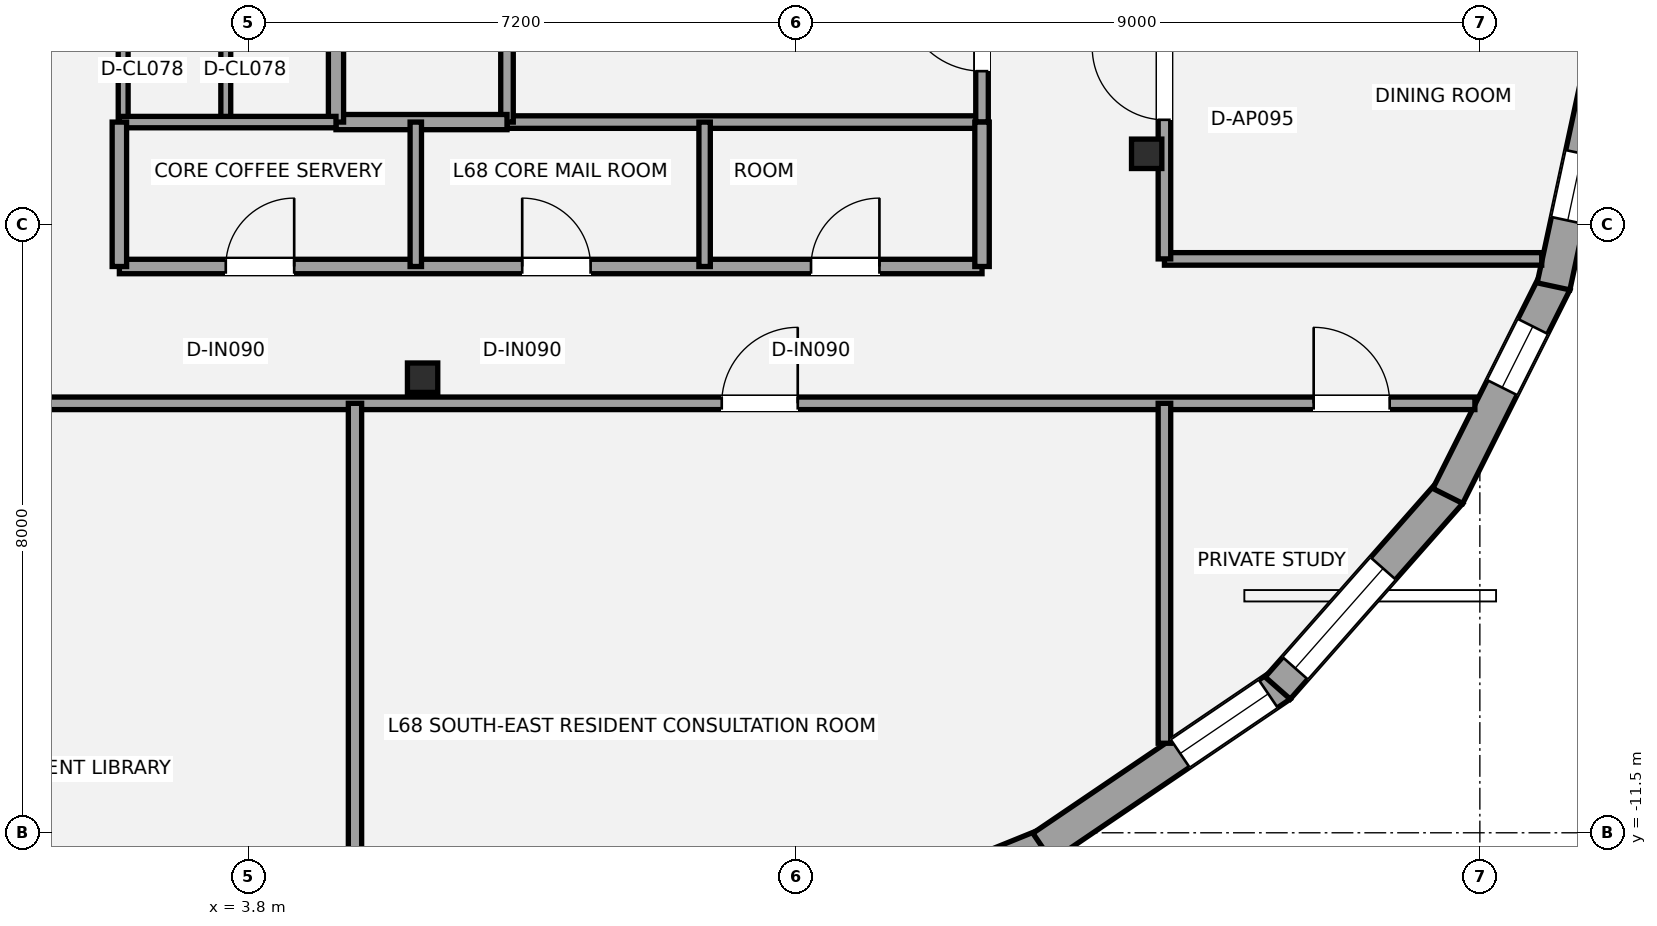
"""IFC4 building model, lengths in metres.
Left out: names, types, materials, properties, quantities, classifications, styles, units other than length and angle.
Written with IfcOpenShell. Run it as: python <this file> out.ifc"""

import sys

from ifc_helpers import new_model, si_unit, direction, frame, frame_2d, origin, origin_2d, place, context, subcontext, project, spatial, rectangle, i_section, extrude, element, fill, save


model = new_model("IFC4")
c1 = context("Model", 3, precision=1e-05, world=origin(), true_north=direction((0.0, 1.0)))
c2 = subcontext(c1, "Body", "Model", "MODEL_VIEW")
j1 = project(units=[si_unit("LENGTHUNIT", "METRE"), si_unit("PLANEANGLEUNIT", "RADIAN")], contexts=[c1])
p1 = place(None, origin())
s1 = spatial("IfcSite", under=j1, at=p1, CompositionType="ELEMENT")
p2 = place(p1, origin())
s2 = spatial("IfcBuilding", under=s1, at=p2, CompositionType="ELEMENT")
p3 = place(p2, frame((0.0, 0.0, 241.5)))
s3 = spatial("IfcBuildingStorey", under=s2, at=p3, CompositionType="ELEMENT", Elevation=241.5)
for number, where, z_axis, x_axis in (
    (1, (6.09, -5.513, 0.0), (0.0, 0.0, 1.0), (1.0, 0.0, 0.0)),
    (2, (15.616, -2.567, 0.0), (0.0, 0.0, 1.0), (1.0, 0.0, 0.0)),
):
    element("IfcColumn", number, at=place(p3, frame(where, z_axis=z_axis, x_axis=x_axis)), inside=s3, PredefinedType="COLUMN", context=c2, shape_type="SweptSolid", body=[
        extrude(i_section(OverallWidth=0.399, OverallDepth=0.387, WebThickness=0.021, FlangeThickness=0.033, at=origin_2d()), origin(), (0.0, 0.0, 1.0), 3.15),
    ])
p4 = place(p3, frame((14.283, -11.666, 0.0), z_axis=(0.0, 0.0, 1.0), x_axis=(-0.926731976866, -0.375723093586, 0.0)))
e3 = element("IfcWall", 3, at=p4, inside=s3, PredefinedType="STANDARD", context=c2, shape_type="SweptSolid", body=[
    extrude(rectangle(XDim=4.096, YDim=0.44, at=frame_2d((2.048, 0.0))), origin(), (0.0, 0.0, 1.0), 2.336),
])
p5 = place(p4, frame((1.498, 0.0, 0.55)))
e4 = element("IfcOpeningElement", 4, at=p5, cuts=e3, PredefinedType="OPENING", context=c2, shape_type="SweptSolid", body=[
    extrude(rectangle(XDim=1.75, YDim=1.55, at=frame_2d((0.875, 0.775))), frame((0.0, 0.23, 0.0), z_axis=(0.0, -1.0, 0.0), x_axis=(1.0, 0.0, 0.0)), (0.0, 0.0, 1.0), 0.46),
])
p6 = place(p3, frame((17.381, -9.559, 0.0), z_axis=(0.0, 0.0, 1.0), x_axis=(-0.827637036896, -0.561263694851, 0.0)))
e5 = element("IfcWall", 5, at=p6, inside=s3, PredefinedType="STANDARD", context=c2, shape_type="SweptSolid", body=[
    extrude(rectangle(XDim=3.793, YDim=0.44, at=frame_2d((1.896, 0.0))), origin(), (0.0, 0.0, 1.0), 2.336),
])
p7 = place(p6, frame((0.2, 0.0, 0.58)))
e6 = element("IfcOpeningElement", 6, at=p7, cuts=e5, PredefinedType="OPENING", context=c2, shape_type="SweptSolid", body=[
    extrude(rectangle(XDim=1.4, YDim=1.55, at=frame_2d((0.7, 0.775))), frame((0.0, 0.23, 0.0), z_axis=(0.0, -1.0, 0.0), x_axis=(1.0, 0.0, 0.0)), (0.0, 0.0, 1.0), 0.46),
])
p8 = place(p3, frame((19.61, -7.022, 0.0), z_axis=(0.0, 0.0, 1.0), x_axis=(-0.66136043846, -0.750068243855, 0.0)))
e7 = element("IfcWall", 7, at=p8, inside=s3, PredefinedType="STANDARD", context=c2, shape_type="SweptSolid", body=[
    extrude(rectangle(XDim=3.432, YDim=0.44, at=frame_2d((1.716, 0.0))), origin(), (0.0, 0.0, 1.0), 2.336),
])
p9 = place(p8, frame((1.334, 0.0, 0.55)))
e8 = element("IfcOpeningElement", 8, at=p9, cuts=e7, PredefinedType="OPENING", context=c2, shape_type="SweptSolid", body=[
    extrude(rectangle(XDim=1.75, YDim=1.55, at=frame_2d((0.875, 0.775))), frame((0.0, 0.23, 0.0), z_axis=(0.0, -1.0, 0.0), x_axis=(1.0, 0.0, 0.0)), (0.0, 0.0, 1.0), 0.46),
])
p10 = place(p3, frame((20.988, -4.259, 0.0), z_axis=(0.0, 0.0, 1.0), x_axis=(-0.448424724145, -0.893820601002, 0.0)))
e9 = element("IfcWall", 9, at=p10, inside=s3, PredefinedType="STANDARD", context=c2, shape_type="SweptSolid", body=[
    extrude(rectangle(XDim=3.144, YDim=0.44, at=frame_2d((1.572, 0.0))), origin(), (0.0, 0.0, 1.0), 2.336),
])
p11 = place(p10, frame((0.648, 0.0, 0.58)))
e10 = element("IfcOpeningElement", 10, at=p11, cuts=e9, PredefinedType="OPENING", context=c2, shape_type="SweptSolid", body=[
    extrude(rectangle(XDim=0.9, YDim=1.35, at=frame_2d((0.45, 0.675))), frame((0.0, 0.23, 0.0), z_axis=(0.0, -1.0, 0.0), x_axis=(1.0, 0.0, 0.0)), (0.0, 0.0, 1.0), 0.46),
])
p12 = place(p3, frame((21.594, -1.41, 0.0), z_axis=(0.0, 0.0, 1.0), x_axis=(-0.210540350534, -0.977585168053, 0.0)))
e11 = element("IfcWall", 11, at=p12, inside=s3, PredefinedType="STANDARD", context=c2, shape_type="SweptSolid", body=[
    extrude(rectangle(XDim=2.967, YDim=0.44, at=frame_2d((1.484, 0.0))), origin(), (0.0, 0.0, 1.0), 2.336),
])
p13 = place(p12, frame((1.181, 0.0, 0.58)))
e12 = element("IfcOpeningElement", 12, at=p13, cuts=e11, PredefinedType="OPENING", context=c2, shape_type="SweptSolid", body=[
    extrude(rectangle(XDim=0.9, YDim=1.35, at=frame_2d((0.45, 0.675))), frame((0.0, 0.23, 0.0), z_axis=(0.0, -1.0, 0.0), x_axis=(1.0, 0.0, 0.0)), (0.0, 0.0, 1.0), 0.46),
])
p14 = place(p3, frame((7.2, -2.15, 0.0), z_axis=(0.0, 0.0, 1.0), x_axis=(1.0, 0.0, 0.0)))
e13 = element("IfcWall", 13, at=p14, inside=s3, PredefinedType="PARTITIONING", context=c2, shape_type="SweptSolid", body=[
    extrude(rectangle(XDim=6.25, YDim=0.165, at=frame_2d((3.125, 0.0))), origin(), (0.0, 0.0, 1.0), 2.97),
])
p15 = place(p3, frame((7.2, -2.15, 0.0), z_axis=(0.0, 0.0, 1.0), x_axis=(0.0, 1.0, 0.0)))
e14 = element("IfcWall", 14, at=p15, inside=s3, PredefinedType="PARTITIONING", context=c2, shape_type="SweptSolid", body=[
    extrude(rectangle(XDim=3.5, YDim=0.165, at=frame_2d((1.75, 0.0))), origin(), (0.0, 0.0, 1.0), 2.423),
])
p16 = place(p3, frame((13.45, -2.15, 0.0), z_axis=(0.0, 0.0, 1.0), x_axis=(0.0, 1.0, 0.0)))
e15 = element("IfcWall", 15, at=p16, inside=s3, PredefinedType="PARTITIONING", context=c2, shape_type="SweptSolid", body=[
    extrude(rectangle(XDim=3.5, YDim=0.165, at=frame_2d((1.75, 0.0))), origin(), (0.0, 0.0, 1.0), 2.423),
])
p17 = place(p16, frame((0.67, 0.0, 0.0)))
e16 = element("IfcOpeningElement", 16, at=p17, cuts=e15, PredefinedType="OPENING", context=c2, shape_type="SweptSolid", body=[
    extrude(rectangle(XDim=1.05, YDim=2.15, at=frame_2d((0.525, 1.075))), frame((0.0, 0.093, 0.0), z_axis=(0.0, -1.0, 0.0), x_axis=(1.0, 0.0, 0.0)), (0.0, 0.0, 1.0), 0.185),
])
p18 = place(p3, frame((4.95, -2.15, 0.0), z_axis=(0.0, 0.0, 1.0), x_axis=(1.0, 0.0, 0.0)))
e17 = element("IfcWall", 17, at=p18, inside=s3, PredefinedType="SOLIDWALL", context=c2, shape_type="SweptSolid", body=[
    extrude(rectangle(XDim=2.25, YDim=0.2, at=frame_2d((1.125, 0.0))), origin(), (0.0, 0.0, 1.0), 2.97),
])
p19 = place(p3, frame((4.95, -2.15, 0.0), z_axis=(0.0, 0.0, 1.0), x_axis=(0.0, 1.0, 0.0)))
e18 = element("IfcWall", 18, at=p19, inside=s3, PredefinedType="SOLIDWALL", context=c2, shape_type="SweptSolid", body=[
    extrude(rectangle(XDim=3.5, YDim=0.2, at=frame_2d((1.75, 0.0))), origin(), (0.0, 0.0, 1.0), 2.423),
])
p20 = place(p19, frame((0.95, 0.0, 0.0)))
e19 = element("IfcOpeningElement", 19, at=p20, cuts=e18, PredefinedType="OPENING", context=c2, shape_type="SweptSolid", body=[
    extrude(rectangle(XDim=0.75, YDim=2.1, at=frame_2d((0.375, 1.05))), frame((0.0, 0.11, 0.0), z_axis=(0.0, -1.0, 0.0), x_axis=(1.0, 0.0, 0.0)), (0.0, 0.0, 1.0), 0.22),
])
for number, where, z_axis, x_axis in (
    (20, (2.15, -2.15, 0.0), (0.0, 0.0, 1.0), (0.0, 1.0, 0.0)),
    (21, (3.5, -2.15, 0.0), (0.0, 0.0, 1.0), (0.0, 1.0, 0.0)),
):
    element("IfcWall", number, at=place(p3, frame(where, z_axis=z_axis, x_axis=x_axis)), inside=s3, PredefinedType="PARTITIONING", context=c2, shape_type="SweptSolid", body=[
        extrude(rectangle(XDim=1.8, YDim=0.13, at=frame_2d((0.9, 0.0))), origin(), (0.0, 0.0, 1.0), 2.97),
    ])
p21 = place(p3, frame((2.1, -4.05, 0.0), z_axis=(0.0, 0.0, 1.0), x_axis=(1.0, 0.0, 0.0)))
e22 = element("IfcWall", 22, at=p21, inside=s3, PredefinedType="PLUMBINGWALL", context=c2, shape_type="SweptSolid", body=[
    extrude(rectangle(XDim=11.35, YDim=0.19, at=frame_2d((5.675, 0.0))), origin(), (0.0, 0.0, 1.0), 2.357),
])
p22 = place(p21, frame((1.4, 0.0, 0.0)))
e23 = element("IfcOpeningElement", 23, at=p22, cuts=e22, PredefinedType="OPENING", context=c2, shape_type="SweptSolid", body=[
    extrude(rectangle(XDim=0.9, YDim=2.1, at=frame_2d((0.45, 1.05))), frame((0.0, 0.105, 0.0), z_axis=(0.0, -1.0, 0.0), x_axis=(1.0, 0.0, 0.0)), (0.0, 0.0, 1.0), 0.21),
])
p23 = place(p21, frame((5.3, 0.0, 0.0)))
e24 = element("IfcOpeningElement", 24, at=p23, cuts=e22, PredefinedType="OPENING", context=c2, shape_type="SweptSolid", body=[
    extrude(rectangle(XDim=0.9, YDim=2.1, at=frame_2d((0.45, 1.05))), frame((0.0, 0.105, 0.0), z_axis=(0.0, -1.0, 0.0), x_axis=(1.0, 0.0, 0.0)), (0.0, 0.0, 1.0), 0.21),
])
p24 = place(p21, frame((9.1, 0.0, 0.0)))
e25 = element("IfcOpeningElement", 25, at=p24, cuts=e22, PredefinedType="OPENING", context=c2, shape_type="SweptSolid", body=[
    extrude(rectangle(XDim=0.9, YDim=2.1, at=frame_2d((0.45, 1.05))), frame((0.0, 0.105, 0.0), z_axis=(0.0, -1.0, 0.0), x_axis=(1.0, 0.0, 0.0)), (0.0, 0.0, 1.0), 0.21),
])
p25 = place(p3, frame((2.1, -2.15, 0.0), z_axis=(0.0, 0.0, 1.0), x_axis=(1.0, 0.0, 0.0)))
e26 = element("IfcWall", 26, at=p25, inside=s3, PredefinedType="PLUMBINGWALL", context=c2, shape_type="SweptSolid", body=[
    extrude(rectangle(XDim=2.85, YDim=0.15, at=frame_2d((1.425, 0.0))), origin(), (0.0, 0.0, 1.0), 2.97),
])
p26 = place(p3, frame((2.1, -4.05, 0.0), z_axis=(0.0, 0.0, 1.0), x_axis=(0.0, 1.0, 0.0)))
e27 = element("IfcWall", 27, at=p26, inside=s3, PredefinedType="PLUMBINGWALL", context=c2, shape_type="SweptSolid", body=[
    extrude(rectangle(XDim=1.9, YDim=0.19, at=frame_2d((0.95, 0.0))), origin(), (0.0, 0.0, 1.0), 2.97),
])
p27 = place(p3, frame((13.45, -4.05, 0.0), z_axis=(0.0, 0.0, 1.0), x_axis=(0.0, 1.0, 0.0)))
e28 = element("IfcWall", 28, at=p27, inside=s3, PredefinedType="PLUMBINGWALL", context=c2, shape_type="SweptSolid", body=[
    extrude(rectangle(XDim=1.9, YDim=0.19, at=frame_2d((0.95, 0.0))), origin(), (0.0, 0.0, 1.0), 2.423),
])
p28 = place(p3, frame((6.0, -4.05, 0.0), z_axis=(0.0, 0.0, 1.0), x_axis=(0.0, 1.0, 0.0)))
e29 = element("IfcWall", 29, at=p28, inside=s3, PredefinedType="PLUMBINGWALL", context=c2, shape_type="SweptSolid", body=[
    extrude(rectangle(XDim=1.9, YDim=0.15, at=frame_2d((0.95, 0.0))), origin(), (0.0, 0.0, 1.0), 2.431),
])
p29 = place(p3, frame((9.8, -4.05, 0.0), z_axis=(0.0, 0.0, 1.0), x_axis=(0.0, 1.0, 0.0)))
e30 = element("IfcWall", 30, at=p29, inside=s3, PredefinedType="PLUMBINGWALL", context=c2, shape_type="SweptSolid", body=[
    extrude(rectangle(XDim=1.9, YDim=0.15, at=frame_2d((0.95, 0.0))), origin(), (0.0, 0.0, 1.0), 2.97),
])
p30 = place(p3, frame((-19.935, -5.85, 0.0), z_axis=(0.0, 0.0, 1.0), x_axis=(1.0, 0.0, 0.0)))
e31 = element("IfcWall", 31, at=p30, inside=s3, PredefinedType="PARTITIONING", context=c2, shape_type="SweptSolid", body=[
    extrude(rectangle(XDim=39.869, YDim=0.165, at=frame_2d((19.935, 0.0))), origin(), (0.0, 0.0, 1.0), 2.423),
])
p31 = place(p30, frame((1.221, 0.0, 0.0)))
e32 = element("IfcOpeningElement", 32, at=p31, cuts=e31, PredefinedType="OPENING", context=c2, shape_type="SweptSolid", body=[
    extrude(rectangle(XDim=1.0, YDim=2.15, at=frame_2d((0.5, 1.075))), frame((0.0, 0.093, 0.0), z_axis=(0.0, -1.0, 0.0), x_axis=(1.0, 0.0, 0.0)), (0.0, 0.0, 1.0), 0.185),
])
p32 = place(p30, frame((37.748, 0.0, 0.0)))
e33 = element("IfcOpeningElement", 33, at=p32, cuts=e31, PredefinedType="OPENING", context=c2, shape_type="SweptSolid", body=[
    extrude(rectangle(XDim=1.0, YDim=2.15, at=frame_2d((0.5, 1.075))), frame((0.0, 0.093, 0.0), z_axis=(0.0, -1.0, 0.0), x_axis=(1.0, 0.0, 0.0)), (0.0, 0.0, 1.0), 0.185),
])
p33 = place(p30, frame((9.01, 0.0, 0.0)))
e34 = element("IfcOpeningElement", 34, at=p33, cuts=e31, PredefinedType="OPENING", context=c2, shape_type="SweptSolid", body=[
    extrude(rectangle(XDim=1.0, YDim=2.15, at=frame_2d((0.5, 1.075))), frame((0.0, 0.093, 0.0), z_axis=(0.0, -1.0, 0.0), x_axis=(1.0, 0.0, 0.0)), (0.0, 0.0, 1.0), 0.185),
])
p34 = place(p30, frame((19.435, 0.0, 0.0)))
e35 = element("IfcOpeningElement", 35, at=p34, cuts=e31, PredefinedType="OPENING", context=c2, shape_type="SweptSolid", body=[
    extrude(rectangle(XDim=1.0, YDim=2.15, at=frame_2d((0.5, 1.075))), frame((0.0, 0.093, 0.0), z_axis=(0.0, -1.0, 0.0), x_axis=(1.0, 0.0, 0.0)), (0.0, 0.0, 1.0), 0.185),
])
p35 = place(p30, frame((29.96, 0.0, 0.0)))
e36 = element("IfcOpeningElement", 36, at=p35, cuts=e31, PredefinedType="OPENING", context=c2, shape_type="SweptSolid", body=[
    extrude(rectangle(XDim=1.0, YDim=2.15, at=frame_2d((0.5, 1.075))), frame((0.0, 0.093, 0.0), z_axis=(0.0, -1.0, 0.0), x_axis=(1.0, 0.0, 0.0)), (0.0, 0.0, 1.0), 0.185),
])
p36 = place(p3, frame((15.85, -3.95, 0.0), z_axis=(0.0, 0.0, 1.0), x_axis=(1.0, 0.0, 0.0)))
e37 = element("IfcWall", 37, at=p36, inside=s3, PredefinedType="PARTITIONING", context=c2, shape_type="SweptSolid", body=[
    extrude(rectangle(XDim=4.964, YDim=0.165, at=frame_2d((2.482, 0.0))), origin(), (0.0, 0.0, 1.0), 2.423),
])
p37 = place(p3, frame((15.85, -3.95, 0.0), z_axis=(0.0, 0.0, 1.0), x_axis=(0.0, 1.0, 0.0)))
e38 = element("IfcWall", 38, at=p37, inside=s3, PredefinedType="PARTITIONING", context=c2, shape_type="SweptSolid", body=[
    extrude(rectangle(XDim=3.6, YDim=0.165, at=frame_2d((1.8, 0.0))), origin(), (0.0, 0.0, 1.0), 2.357),
])
p38 = place(p37, frame((1.83, 0.0, 0.0)))
e39 = element("IfcOpeningElement", 39, at=p38, cuts=e38, PredefinedType="OPENING", context=c2, shape_type="SweptSolid", body=[
    extrude(rectangle(XDim=0.95, YDim=2.15, at=frame_2d((0.475, 1.075))), frame((0.0, 0.093, 0.0), z_axis=(0.0, -1.0, 0.0), x_axis=(1.0, 0.0, 0.0)), (0.0, 0.0, 1.0), 0.185),
])
p39 = place(p3, frame((15.85, -10.322, 0.0), z_axis=(0.0, 0.0, 1.0), x_axis=(0.0, 1.0, 0.0)))
e40 = element("IfcWall", 40, at=p39, inside=s3, PredefinedType="PARTITIONING", context=c2, shape_type="SweptSolid", body=[
    extrude(rectangle(XDim=4.472, YDim=0.165, at=frame_2d((2.236, 0.0))), origin(), (0.0, 0.0, 1.0), 2.423),
])
p40 = place(p3, frame((5.2, -14.036, 0.0), z_axis=(0.0, 0.0, 1.0), x_axis=(0.0, 1.0, 0.0)))
e41 = element("IfcWall", 41, at=p40, inside=s3, PredefinedType="PARTITIONING", context=c2, shape_type="SweptSolid", body=[
    extrude(rectangle(XDim=8.186, YDim=0.175, at=frame_2d((4.093, 0.0))), origin(), (0.0, 0.0, 1.0), 2.97),
])
p41 = place(p7, origin())
e42 = element("IfcWindow", 42, at=p41, inside=s3, PartitioningType="SINGLE_PANEL", PredefinedType="WINDOW", context=c2, shape_type="SweptSolid", body=[
    extrude(rectangle(XDim=1.4, YDim=1.55, at=frame_2d((0.7, 0.775))), frame((0.0, -0.01, 0.0), z_axis=(0.0, -1.0, 0.0), x_axis=(1.0, 0.0, 0.0)), (0.0, 0.0, 1.0), 0.06),
])
fill(e6, e42)
p42 = place(p9, origin())
e43 = element("IfcWindow", 43, at=p42, inside=s3, PartitioningType="SINGLE_PANEL", PredefinedType="WINDOW", context=c2, shape_type="SweptSolid", body=[
    extrude(rectangle(XDim=1.75, YDim=1.55, at=frame_2d((0.875, 0.775))), frame((0.0, -0.01, 0.0), z_axis=(0.0, -1.0, 0.0), x_axis=(1.0, 0.0, 0.0)), (0.0, 0.0, 1.0), 0.06),
])
fill(e8, e43)
p43 = place(p11, origin())
e44 = element("IfcWindow", 44, at=p43, inside=s3, PartitioningType="SINGLE_PANEL", PredefinedType="WINDOW", context=c2, shape_type="SweptSolid", body=[
    extrude(rectangle(XDim=0.9, YDim=1.35, at=frame_2d((0.45, 0.675))), frame((0.0, -0.01, 0.0), z_axis=(0.0, -1.0, 0.0), x_axis=(1.0, 0.0, 0.0)), (0.0, 0.0, 1.0), 0.06),
])
fill(e10, e44)
p44 = place(p13, origin())
e45 = element("IfcWindow", 45, at=p44, inside=s3, PartitioningType="SINGLE_PANEL", PredefinedType="WINDOW", context=c2, shape_type="SweptSolid", body=[
    extrude(rectangle(XDim=0.9, YDim=1.35, at=frame_2d((0.45, 0.675))), frame((0.0, -0.01, 0.0), z_axis=(0.0, -1.0, 0.0), x_axis=(1.0, 0.0, 0.0)), (0.0, 0.0, 1.0), 0.06),
])
fill(e12, e45)
p45 = place(p17, origin())
e46 = element("IfcDoor", 46, at=p45, inside=s3, OperationType="SINGLE_SWING_RIGHT", PredefinedType="DOOR", context=c2, shape_type="SweptSolid", body=[
    extrude(rectangle(XDim=1.05, YDim=2.15, at=frame_2d((0.525, 1.075))), frame((0.0, 0.025, 0.0), z_axis=(0.0, -1.0, 0.0), x_axis=(1.0, 0.0, 0.0)), (0.0, 0.0, 1.0), 0.05),
])
fill(e16, e46)
p46 = place(p22, origin())
e47 = element("IfcDoor", 47, at=p46, inside=s3, OperationType="SINGLE_SWING_RIGHT", PredefinedType="DOOR", context=c2, shape_type="SweptSolid", body=[
    extrude(rectangle(XDim=0.9, YDim=2.1, at=frame_2d((0.45, 1.05))), frame((0.0, 0.025, 0.0), z_axis=(0.0, -1.0, 0.0), x_axis=(1.0, 0.0, 0.0)), (0.0, 0.0, 1.0), 0.05),
])
fill(e23, e47)
p47 = place(p23, origin())
e48 = element("IfcDoor", 48, at=p47, inside=s3, OperationType="SINGLE_SWING_LEFT", PredefinedType="DOOR", context=c2, shape_type="SweptSolid", body=[
    extrude(rectangle(XDim=0.9, YDim=2.1, at=frame_2d((0.45, 1.05))), frame((0.0, 0.025, 0.0), z_axis=(0.0, -1.0, 0.0), x_axis=(1.0, 0.0, 0.0)), (0.0, 0.0, 1.0), 0.05),
])
fill(e24, e48)
p48 = place(p24, origin())
e49 = element("IfcDoor", 49, at=p48, inside=s3, OperationType="SINGLE_SWING_RIGHT", PredefinedType="DOOR", context=c2, shape_type="SweptSolid", body=[
    extrude(rectangle(XDim=0.9, YDim=2.1, at=frame_2d((0.45, 1.05))), frame((0.0, 0.025, 0.0), z_axis=(0.0, -1.0, 0.0), x_axis=(1.0, 0.0, 0.0)), (0.0, 0.0, 1.0), 0.05),
])
fill(e25, e49)
p49 = place(p32, origin())
e50 = element("IfcDoor", 50, at=p49, inside=s3, OperationType="SINGLE_SWING_LEFT", PredefinedType="DOOR", context=c2, shape_type="SweptSolid", body=[
    extrude(rectangle(XDim=1.0, YDim=2.15, at=frame_2d((0.5, 1.075))), frame((0.0, 0.025, 0.0), z_axis=(0.0, -1.0, 0.0), x_axis=(1.0, 0.0, 0.0)), (0.0, 0.0, 1.0), 0.05),
])
fill(e33, e50)
p50 = place(p35, origin())
e51 = element("IfcDoor", 51, at=p50, inside=s3, OperationType="SINGLE_SWING_RIGHT", PredefinedType="DOOR", context=c2, shape_type="SweptSolid", body=[
    extrude(rectangle(XDim=1.0, YDim=2.15, at=frame_2d((0.5, 1.075))), frame((0.0, 0.025, 0.0), z_axis=(0.0, -1.0, 0.0), x_axis=(1.0, 0.0, 0.0)), (0.0, 0.0, 1.0), 0.05),
])
fill(e36, e51)
p51 = place(p38, origin())
e52 = element("IfcDoor", 52, at=p51, inside=s3, OperationType="SINGLE_SWING_RIGHT", PredefinedType="DOOR", context=c2, shape_type="SweptSolid", body=[
    extrude(rectangle(XDim=0.95, YDim=2.15, at=frame_2d((0.475, 1.075))), frame((0.0, 0.025, 0.0), z_axis=(0.0, -1.0, 0.0), x_axis=(1.0, 0.0, 0.0)), (0.0, 0.0, 1.0), 0.05),
])
fill(e39, e52)
save(model, sys.argv[1])
